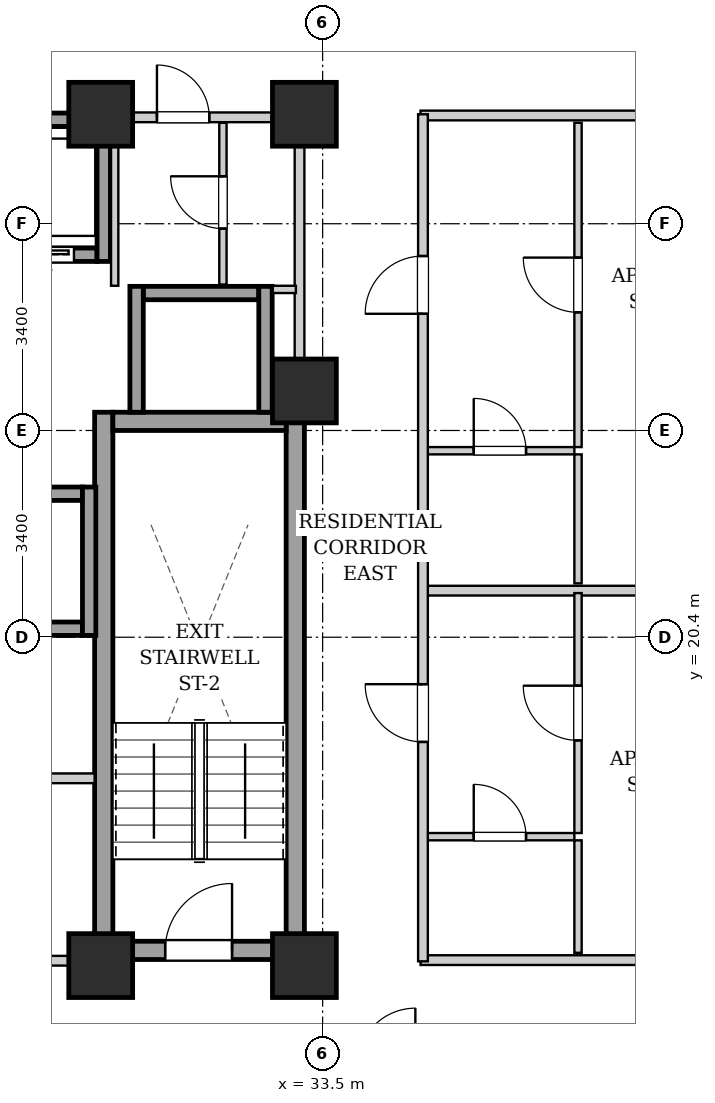
"""IFC4 building model, lengths in metres.
Left out: names, types, materials, properties, quantities, classifications, styles, units other than length and angle.
Written with IfcOpenShell. Run it as: python <this file> out.ifc"""

import sys

from ifc_helpers import new_model, si_unit, direction, frame, frame_2d, origin, origin_2d, place, context, subcontext, project, spatial, rectangle, extrude, element, fill, save


model = new_model("IFC4")
c1 = context("Model", 3, precision=1e-05, world=origin(), true_north=direction((0.0, 1.0)))
c2 = subcontext(c1, "Body", "Model", "MODEL_VIEW")
j1 = project(units=[si_unit("LENGTHUNIT", "METRE"), si_unit("PLANEANGLEUNIT", "RADIAN")], contexts=[c1])
p1 = place(None, origin())
s1 = spatial("IfcSite", under=j1, at=p1, CompositionType="ELEMENT")
p2 = place(p1, origin())
s2 = spatial("IfcBuilding", under=s1, at=p2, CompositionType="ELEMENT")
p3 = place(p2, frame((0.0, 0.0, 91.1)))
s3 = spatial("IfcBuildingStorey", under=s2, at=p3, CompositionType="ELEMENT", Elevation=91.1)
for number, where, z_axis, x_axis in (
    (1, (29.85, 15.0, 0.0), (0.0, 0.0, 1.0), (1.0, 0.0, 0.0)),
    (2, (33.2, 15.0, 0.0), (0.0, 0.0, 1.0), (1.0, 0.0, 0.0)),
    (3, (29.85, 29.0, 0.0), (0.0, 0.0, 1.0), (1.0, 0.0, 0.0)),
    (4, (33.2, 29.0, 0.0), (0.0, 0.0, 1.0), (1.0, 0.0, 0.0)),
    (5, (33.2, 24.45, 0.0), (0.0, 0.0, 1.0), (1.0, 0.0, 0.0)),
):
    element("IfcColumn", number, at=place(p3, frame(where, z_axis=z_axis, x_axis=x_axis)), inside=s3, PredefinedType="COLUMN", context=c2, shape_type="SweptSolid", body=[
        extrude(rectangle(XDim=1.05, YDim=1.05, at=origin_2d()), origin(), (0.0, 0.0, 1.0), 3.2),
    ])
for number, where, z_axis, x_axis in (
    (6, (29.9, 15.1, 0.0), (0.0, 0.0, 1.0), (0.0, 1.0, 0.0)),
    (7, (33.05, 15.1, 0.0), (0.0, 0.0, 1.0), (0.0, 1.0, 0.0)),
):
    element("IfcWall", number, at=place(p3, frame(where, z_axis=z_axis, x_axis=x_axis)), inside=s3, PredefinedType="SHEAR", context=c2, shape_type="SweptSolid", body=[
        extrude(rectangle(XDim=9.0, YDim=0.3, at=frame_2d((4.5, 0.0))), origin(), (0.0, 0.0, 1.0), 2.94),
    ])
p4 = place(p3, frame((30.05, 23.95, 0.0), z_axis=(0.0, 0.0, 1.0), x_axis=(1.0, 0.0, 0.0)))
e8 = element("IfcWall", 8, at=p4, inside=s3, PredefinedType="SHEAR", context=c2, shape_type="SweptSolid", body=[
    extrude(rectangle(XDim=2.85, YDim=0.3, at=frame_2d((1.425, 0.0))), origin(), (0.0, 0.0, 1.0), 2.94),
])
p5 = place(p3, frame((30.05, 15.25, 0.0), z_axis=(0.0, 0.0, 1.0), x_axis=(1.0, 0.0, 0.0)))
e9 = element("IfcWall", 9, at=p5, inside=s3, PredefinedType="SHEAR", context=c2, shape_type="SweptSolid", body=[
    extrude(rectangle(XDim=2.85, YDim=0.3, at=frame_2d((1.425, 0.0))), origin(), (0.0, 0.0, 1.0), 2.94),
])
p6 = place(p5, frame((0.86, 0.0, 0.0)))
e10 = element("IfcOpeningElement", 10, at=p6, cuts=e9, PredefinedType="OPENING", context=c2, shape_type="SweptSolid", body=[
    extrude(rectangle(XDim=1.1, YDim=2.05, at=frame_2d((0.55, 1.025))), frame((0.0, 0.16, 0.0), z_axis=(0.0, -1.0, 0.0), x_axis=(1.0, 0.0, 0.0)), (0.0, 0.0, 1.0), 0.32),
])
p7 = place(p3, frame((27.93, 26.69, 0.0), z_axis=(0.0, 0.0, 1.0), x_axis=(1.0, 0.0, 0.0)))
e11 = element("IfcWall", 11, at=p7, inside=s3, PredefinedType="SHEAR", context=c2, shape_type="SweptSolid", body=[
    extrude(rectangle(XDim=1.86, YDim=0.22, at=frame_2d((0.93, 0.0))), origin(), (0.0, 0.0, 1.0), 2.94),
])
p8 = place(p7, frame((0.38, 0.0, 0.0)))
e12 = element("IfcOpeningElement", 12, at=p8, cuts=e11, PredefinedType="OPENING", context=c2, shape_type="SweptSolid", body=[
    extrude(rectangle(XDim=1.1, YDim=2.15, at=frame_2d((0.55, 1.075))), frame((0.0, 0.12, 0.0), z_axis=(0.0, -1.0, 0.0), x_axis=(1.0, 0.0, 0.0)), (0.0, 0.0, 1.0), 0.24),
])
p9 = place(p3, frame((27.93, 28.91, 0.0), z_axis=(0.0, 0.0, 1.0), x_axis=(1.0, 0.0, 0.0)))
e13 = element("IfcWall", 13, at=p9, inside=s3, PredefinedType="SHEAR", context=c2, shape_type="SweptSolid", body=[
    extrude(rectangle(XDim=1.86, YDim=0.22, at=frame_2d((0.93, 0.0))), origin(), (0.0, 0.0, 1.0), 2.94),
])
p10 = place(p3, frame((29.9, 26.58, 0.0), z_axis=(0.0, 0.0, 1.0), x_axis=(0.0, 1.0, 0.0)))
e14 = element("IfcWall", 14, at=p10, inside=s3, PredefinedType="SHEAR", context=c2, shape_type="SweptSolid", body=[
    extrude(rectangle(XDim=2.44, YDim=0.22, at=frame_2d((1.22, 0.0))), origin(), (0.0, 0.0, 1.0), 2.94),
])
for number, where, z_axis, x_axis in (
    (15, (27.65, 20.54, 0.0), (0.0, 0.0, 1.0), (1.0, 0.0, 0.0)),
    (16, (27.65, 22.76, 0.0), (0.0, 0.0, 1.0), (1.0, 0.0, 0.0)),
):
    element("IfcWall", number, at=place(p3, frame(where, z_axis=z_axis, x_axis=x_axis)), inside=s3, PredefinedType="SHEAR", context=c2, shape_type="SweptSolid", body=[
        extrude(rectangle(XDim=1.9, YDim=0.22, at=frame_2d((0.95, 0.0))), origin(), (0.0, 0.0, 1.0), 2.94),
    ])
p11 = place(p3, frame((29.66, 20.43, 0.0), z_axis=(0.0, 0.0, 1.0), x_axis=(0.0, 1.0, 0.0)))
e17 = element("IfcWall", 17, at=p11, inside=s3, PredefinedType="SHEAR", context=c2, shape_type="SweptSolid", body=[
    extrude(rectangle(XDim=2.44, YDim=0.22, at=frame_2d((1.22, 0.0))), origin(), (0.0, 0.0, 1.0), 2.94),
])
p12 = place(p3, frame((30.55, 26.06, 0.0), z_axis=(0.0, 0.0, 1.0), x_axis=(1.0, 0.0, 0.0)))
e18 = element("IfcWall", 18, at=p12, inside=s3, PredefinedType="SHEAR", context=c2, shape_type="SweptSolid", body=[
    extrude(rectangle(XDim=1.9, YDim=0.22, at=frame_2d((0.95, 0.0))), origin(), (0.0, 0.0, 1.0), 2.94),
])
for number, where, z_axis, x_axis in (
    (19, (30.44, 24.1, 0.0), (0.0, 0.0, 1.0), (0.0, 1.0, 0.0)),
    (20, (32.56, 24.1, 0.0), (0.0, 0.0, 1.0), (0.0, 1.0, 0.0)),
):
    element("IfcWall", number, at=place(p3, frame(where, z_axis=z_axis, x_axis=x_axis)), inside=s3, PredefinedType="SHEAR", context=c2, shape_type="SweptSolid", body=[
        extrude(rectangle(XDim=2.07, YDim=0.22, at=frame_2d((1.035, 0.0))), origin(), (0.0, 0.0, 1.0), 2.94),
    ])
p13 = place(p3, frame((21.25, 15.08, 0.0), z_axis=(0.0, 0.0, 1.0), x_axis=(1.0, 0.0, 0.0)))
e21 = element("IfcWall", 21, at=p13, inside=s3, PredefinedType="PARTITIONING", context=c2, shape_type="SweptSolid", body=[
    extrude(rectangle(XDim=8.5, YDim=0.16, at=frame_2d((4.25, 0.0))), origin(), (0.0, 0.0, 1.0), 2.309),
])
p14 = place(p13, frame((3.725, 0.0, 0.0)))
e22 = element("IfcOpeningElement", 22, at=p14, cuts=e21, PredefinedType="OPENING", context=c2, shape_type="SweptSolid", body=[
    extrude(rectangle(XDim=1.05, YDim=2.05, at=frame_2d((0.525, 1.025))), frame((0.0, 0.09, 0.0), z_axis=(0.0, -1.0, 0.0), x_axis=(1.0, 0.0, 0.0)), (0.0, 0.0, 1.0), 0.18),
])
p15 = place(p3, frame((28.65, 18.08, 0.0), z_axis=(0.0, 0.0, 1.0), x_axis=(1.0, 0.0, 0.0)))
e23 = element("IfcWall", 23, at=p15, inside=s3, PredefinedType="PARTITIONING", context=c2, shape_type="SweptSolid", body=[
    extrude(rectangle(XDim=1.1, YDim=0.16, at=frame_2d((0.55, 0.0))), origin(), (0.0, 0.0, 1.0), 2.94),
])
p16 = place(p3, frame((33.12, 24.12, 0.0), z_axis=(0.0, 0.0, 1.0), x_axis=(0.0, 1.0, 0.0)))
e24 = element("IfcWall", 24, at=p16, inside=s3, PredefinedType="PARTITIONING", context=c2, shape_type="SweptSolid", body=[
    extrude(rectangle(XDim=4.76, YDim=0.16, at=frame_2d((2.38, 0.0))), origin(), (0.0, 0.0, 1.0), 2.94),
])
p17 = place(p3, frame((30.08, 26.18, 0.0), z_axis=(0.0, 0.0, 1.0), x_axis=(0.0, 1.0, 0.0)))
e25 = element("IfcWall", 25, at=p17, inside=s3, PredefinedType="PARTITIONING", context=c2, shape_type="SweptSolid", body=[
    extrude(rectangle(XDim=2.68, YDim=0.12, at=frame_2d((1.34, 0.0))), origin(), (0.0, 0.0, 1.0), 2.94),
])
p18 = place(p3, frame((32.68, 26.12, 0.0), z_axis=(0.0, 0.0, 1.0), x_axis=(1.0, 0.0, 0.0)))
e26 = element("IfcWall", 26, at=p18, inside=s3, PredefinedType="PARTITIONING", context=c2, shape_type="SweptSolid", body=[
    extrude(rectangle(XDim=0.38, YDim=0.12, at=frame_2d((0.19, 0.0))), origin(), (0.0, 0.0, 1.0), 2.94),
])
p19 = place(p3, frame((31.86, 26.2, 0.0), z_axis=(0.0, 0.0, 1.0), x_axis=(0.0, 1.0, 0.0)))
e27 = element("IfcWall", 27, at=p19, inside=s3, PredefinedType="PARTITIONING", context=c2, shape_type="SweptSolid", body=[
    extrude(rectangle(XDim=2.66, YDim=0.12, at=frame_2d((1.33, 0.0))), origin(), (0.0, 0.0, 1.0), 2.94),
])
p20 = place(p19, frame((0.92, 0.0, 0.0)))
e28 = element("IfcOpeningElement", 28, at=p20, cuts=e27, PredefinedType="OPENING", context=c2, shape_type="SweptSolid", body=[
    extrude(rectangle(XDim=0.86, YDim=2.05, at=frame_2d((0.43, 1.025))), frame((0.0, 0.07, 0.0), z_axis=(0.0, -1.0, 0.0), x_axis=(1.0, 0.0, 0.0)), (0.0, 0.0, 1.0), 0.14),
])
p21 = place(p3, frame((30.08, 28.95, 0.0), z_axis=(0.0, 0.0, 1.0), x_axis=(1.0, 0.0, 0.0)))
e29 = element("IfcWall", 29, at=p21, inside=s3, PredefinedType="PARTITIONING", context=c2, shape_type="SweptSolid", body=[
    extrude(rectangle(XDim=2.96, YDim=0.16, at=frame_2d((1.48, 0.0))), origin(), (0.0, 0.0, 1.0), 2.94),
])
p22 = place(p21, frame((0.695, 0.0, 0.0)))
e30 = element("IfcOpeningElement", 30, at=p22, cuts=e29, PredefinedType="OPENING", context=c2, shape_type="SweptSolid", body=[
    extrude(rectangle(XDim=0.86, YDim=2.05, at=frame_2d((0.43, 1.025))), frame((0.0, 0.09, 0.0), z_axis=(0.0, -1.0, 0.0), x_axis=(1.0, 0.0, 0.0)), (0.0, 0.0, 1.0), 0.18),
])
for number, where, z_axis, x_axis in (
    (31, (35.11, 15.09, 0.0), (0.0, 0.0, 1.0), (1.0, 0.0, 0.0)),
    (32, (35.11, 28.98, 0.0), (0.0, 0.0, 1.0), (1.0, 0.0, 0.0)),
):
    element("IfcWall", number, at=place(p3, frame(where, z_axis=z_axis, x_axis=x_axis)), inside=s3, PredefinedType="PARTITIONING", context=c2, shape_type="SweptSolid", body=[
        extrude(rectangle(XDim=8.01, YDim=0.16, at=frame_2d((4.005, 0.0))), origin(), (0.0, 0.0, 1.0), 2.309),
    ])
p23 = place(p3, frame((35.19, 21.166, 0.0), z_axis=(0.0, 0.0, 1.0), x_axis=(1.0, 0.0, 0.0)))
e33 = element("IfcWall", 33, at=p23, inside=s3, PredefinedType="PARTITIONING", context=c2, shape_type="SweptSolid", body=[
    extrude(rectangle(XDim=7.93, YDim=0.16, at=frame_2d((3.965, 0.0))), origin(), (0.0, 0.0, 1.0), 2.94),
])
p24 = place(p3, frame((35.19, 17.12, 0.0), z_axis=(0.0, 0.0, 1.0), x_axis=(1.0, 0.0, 0.0)))
e34 = element("IfcWall", 34, at=p24, inside=s3, PredefinedType="PARTITIONING", context=c2, shape_type="SweptSolid", body=[
    extrude(rectangle(XDim=2.45, YDim=0.12, at=frame_2d((1.225, 0.0))), origin(), (0.0, 0.0, 1.0), 2.94),
])
p25 = place(p24, frame((0.795, 0.0, 0.0)))
e35 = element("IfcOpeningElement", 35, at=p25, cuts=e34, PredefinedType="OPENING", context=c2, shape_type="SweptSolid", body=[
    extrude(rectangle(XDim=0.86, YDim=2.05, at=frame_2d((0.43, 1.025))), frame((0.0, 0.07, 0.0), z_axis=(0.0, -1.0, 0.0), x_axis=(1.0, 0.0, 0.0)), (0.0, 0.0, 1.0), 0.14),
])
p26 = place(p3, frame((37.7, 15.21, 0.0), z_axis=(0.0, 0.0, 1.0), x_axis=(0.0, 1.0, 0.0)))
e36 = element("IfcWall", 36, at=p26, inside=s3, PredefinedType="PARTITIONING", context=c2, shape_type="SweptSolid", body=[
    extrude(rectangle(XDim=1.85, YDim=0.12, at=frame_2d((0.925, 0.0))), origin(), (0.0, 0.0, 1.0), 2.94),
])
p27 = place(p3, frame((37.7, 17.18, 0.0), z_axis=(0.0, 0.0, 1.0), x_axis=(0.0, 1.0, 0.0)))
e37 = element("IfcWall", 37, at=p27, inside=s3, PredefinedType="PARTITIONING", context=c2, shape_type="SweptSolid", body=[
    extrude(rectangle(XDim=3.946, YDim=0.12, at=frame_2d((1.973, 0.0))), origin(), (0.0, 0.0, 1.0), 2.94),
])
p28 = place(p27, frame((1.523, 0.0, 0.0)))
e38 = element("IfcOpeningElement", 38, at=p28, cuts=e37, PredefinedType="OPENING", context=c2, shape_type="SweptSolid", body=[
    extrude(rectangle(XDim=0.9, YDim=2.05, at=frame_2d((0.45, 1.025))), frame((0.0, 0.07, 0.0), z_axis=(0.0, -1.0, 0.0), x_axis=(1.0, 0.0, 0.0)), (0.0, 0.0, 1.0), 0.14),
])
p29 = place(p3, frame((35.19, 23.467, 0.0), z_axis=(0.0, 0.0, 1.0), x_axis=(1.0, 0.0, 0.0)))
e39 = element("IfcWall", 39, at=p29, inside=s3, PredefinedType="PARTITIONING", context=c2, shape_type="SweptSolid", body=[
    extrude(rectangle(XDim=2.45, YDim=0.12, at=frame_2d((1.225, 0.0))), origin(), (0.0, 0.0, 1.0), 2.94),
])
p30 = place(p29, frame((0.795, 0.0, 0.0)))
e40 = element("IfcOpeningElement", 40, at=p30, cuts=e39, PredefinedType="OPENING", context=c2, shape_type="SweptSolid", body=[
    extrude(rectangle(XDim=0.86, YDim=2.05, at=frame_2d((0.43, 1.025))), frame((0.0, 0.07, 0.0), z_axis=(0.0, -1.0, 0.0), x_axis=(1.0, 0.0, 0.0)), (0.0, 0.0, 1.0), 0.14),
])
p31 = place(p3, frame((37.7, 21.286, 0.0), z_axis=(0.0, 0.0, 1.0), x_axis=(0.0, 1.0, 0.0)))
e41 = element("IfcWall", 41, at=p31, inside=s3, PredefinedType="PARTITIONING", context=c2, shape_type="SweptSolid", body=[
    extrude(rectangle(XDim=2.121, YDim=0.12, at=frame_2d((1.061, 0.0))), origin(), (0.0, 0.0, 1.0), 2.94),
])
p32 = place(p3, frame((37.7, 23.527, 0.0), z_axis=(0.0, 0.0, 1.0), x_axis=(0.0, 1.0, 0.0)))
e42 = element("IfcWall", 42, at=p32, inside=s3, PredefinedType="PARTITIONING", context=c2, shape_type="SweptSolid", body=[
    extrude(rectangle(XDim=5.333, YDim=0.12, at=frame_2d((2.667, 0.0))), origin(), (0.0, 0.0, 1.0), 2.94),
])
p33 = place(p32, frame((2.216, 0.0, 0.0)))
e43 = element("IfcOpeningElement", 43, at=p33, cuts=e42, PredefinedType="OPENING", context=c2, shape_type="SweptSolid", body=[
    extrude(rectangle(XDim=0.9, YDim=2.05, at=frame_2d((0.45, 1.025))), frame((0.0, 0.07, 0.0), z_axis=(0.0, -1.0, 0.0), x_axis=(1.0, 0.0, 0.0)), (0.0, 0.0, 1.0), 0.14),
])
p34 = place(p3, frame((35.15, 15.07, 0.0), z_axis=(0.0, 0.0, 1.0), x_axis=(0.0, 1.0, 0.0)))
e44 = element("IfcWall", 44, at=p34, inside=s3, PredefinedType="PARTITIONING", context=c2, shape_type="SweptSolid", body=[
    extrude(rectangle(XDim=13.93, YDim=0.16, at=frame_2d((6.965, 0.0))), origin(), (0.0, 0.0, 1.0), 2.94),
])
p35 = place(p34, frame((3.608, 0.0, 0.0)))
e45 = element("IfcOpeningElement", 45, at=p35, cuts=e44, PredefinedType="OPENING", context=c2, shape_type="SweptSolid", body=[
    extrude(rectangle(XDim=0.95, YDim=2.1, at=frame_2d((0.475, 1.05))), frame((0.0, 0.09, 0.0), z_axis=(0.0, -1.0, 0.0), x_axis=(1.0, 0.0, 0.0)), (0.0, 0.0, 1.0), 0.18),
])
p36 = place(p34, frame((10.649, 0.0, 0.0)))
e46 = element("IfcOpeningElement", 46, at=p36, cuts=e44, PredefinedType="OPENING", context=c2, shape_type="SweptSolid", body=[
    extrude(rectangle(XDim=0.95, YDim=2.1, at=frame_2d((0.475, 1.05))), frame((0.0, 0.09, 0.0), z_axis=(0.0, -1.0, 0.0), x_axis=(1.0, 0.0, 0.0)), (0.0, 0.0, 1.0), 0.18),
])
p37 = place(p6, origin())
e47 = element("IfcDoor", 47, at=p37, inside=s3, OperationType="SINGLE_SWING_RIGHT", PredefinedType="DOOR", context=c2, shape_type="SweptSolid", body=[
    extrude(rectangle(XDim=1.1, YDim=2.05, at=frame_2d((0.55, 1.025))), frame((0.0, 0.025, 0.0), z_axis=(0.0, -1.0, 0.0), x_axis=(1.0, 0.0, 0.0)), (0.0, 0.0, 1.0), 0.05),
])
fill(e10, e47)
p38 = place(p8, origin())
e48 = element("IfcDoor", 48, at=p38, inside=s3, OperationType="SLIDING_TO_LEFT", PredefinedType="DOOR", context=c2, shape_type="SweptSolid", body=[
    extrude(rectangle(XDim=1.1, YDim=2.15, at=frame_2d((0.55, 1.075))), frame((0.0, 0.025, 0.0), z_axis=(0.0, -1.0, 0.0), x_axis=(1.0, 0.0, 0.0)), (0.0, 0.0, 1.0), 0.05),
])
fill(e12, e48)
p39 = place(p20, origin())
e49 = element("IfcDoor", 49, at=p39, inside=s3, OperationType="SINGLE_SWING_RIGHT", PredefinedType="DOOR", context=c2, shape_type="SweptSolid", body=[
    extrude(rectangle(XDim=0.86, YDim=2.05, at=frame_2d((0.43, 1.025))), frame((0.0, 0.025, 0.0), z_axis=(0.0, -1.0, 0.0), x_axis=(1.0, 0.0, 0.0)), (0.0, 0.0, 1.0), 0.05),
])
fill(e28, e49)
p40 = place(p22, origin())
e50 = element("IfcDoor", 50, at=p40, inside=s3, OperationType="SINGLE_SWING_LEFT", PredefinedType="DOOR", context=c2, shape_type="SweptSolid", body=[
    extrude(rectangle(XDim=0.86, YDim=2.05, at=frame_2d((0.43, 1.025))), frame((0.0, 0.025, 0.0), z_axis=(0.0, -1.0, 0.0), x_axis=(1.0, 0.0, 0.0)), (0.0, 0.0, 1.0), 0.05),
])
fill(e30, e50)
p41 = place(p25, origin())
e51 = element("IfcDoor", 51, at=p41, inside=s3, OperationType="SINGLE_SWING_LEFT", PredefinedType="DOOR", context=c2, shape_type="SweptSolid", body=[
    extrude(rectangle(XDim=0.86, YDim=2.05, at=frame_2d((0.43, 1.025))), frame((0.0, 0.025, 0.0), z_axis=(0.0, -1.0, 0.0), x_axis=(1.0, 0.0, 0.0)), (0.0, 0.0, 1.0), 0.05),
])
fill(e35, e51)
p42 = place(p28, origin())
e52 = element("IfcDoor", 52, at=p42, inside=s3, OperationType="SINGLE_SWING_RIGHT", PredefinedType="DOOR", context=c2, shape_type="SweptSolid", body=[
    extrude(rectangle(XDim=0.9, YDim=2.05, at=frame_2d((0.45, 1.025))), frame((0.0, 0.025, 0.0), z_axis=(0.0, -1.0, 0.0), x_axis=(1.0, 0.0, 0.0)), (0.0, 0.0, 1.0), 0.05),
])
fill(e38, e52)
p43 = place(p30, origin())
e53 = element("IfcDoor", 53, at=p43, inside=s3, OperationType="SINGLE_SWING_LEFT", PredefinedType="DOOR", context=c2, shape_type="SweptSolid", body=[
    extrude(rectangle(XDim=0.86, YDim=2.05, at=frame_2d((0.43, 1.025))), frame((0.0, 0.025, 0.0), z_axis=(0.0, -1.0, 0.0), x_axis=(1.0, 0.0, 0.0)), (0.0, 0.0, 1.0), 0.05),
])
fill(e40, e53)
p44 = place(p33, origin())
e54 = element("IfcDoor", 54, at=p44, inside=s3, OperationType="SINGLE_SWING_RIGHT", PredefinedType="DOOR", context=c2, shape_type="SweptSolid", body=[
    extrude(rectangle(XDim=0.9, YDim=2.05, at=frame_2d((0.45, 1.025))), frame((0.0, 0.025, 0.0), z_axis=(0.0, -1.0, 0.0), x_axis=(1.0, 0.0, 0.0)), (0.0, 0.0, 1.0), 0.05),
])
fill(e43, e54)
p45 = place(p35, origin())
e55 = element("IfcDoor", 55, at=p45, inside=s3, OperationType="SINGLE_SWING_RIGHT", PredefinedType="DOOR", context=c2, shape_type="SweptSolid", body=[
    extrude(rectangle(XDim=0.95, YDim=2.1, at=frame_2d((0.475, 1.05))), frame((0.0, 0.025, 0.0), z_axis=(0.0, -1.0, 0.0), x_axis=(1.0, 0.0, 0.0)), (0.0, 0.0, 1.0), 0.05),
])
fill(e45, e55)
p46 = place(p36, origin())
e56 = element("IfcDoor", 56, at=p46, inside=s3, OperationType="SINGLE_SWING_LEFT", PredefinedType="DOOR", context=c2, shape_type="SweptSolid", body=[
    extrude(rectangle(XDim=0.95, YDim=2.1, at=frame_2d((0.475, 1.05))), frame((0.0, 0.025, 0.0), z_axis=(0.0, -1.0, 0.0), x_axis=(1.0, 0.0, 0.0)), (0.0, 0.0, 1.0), 0.05),
])
fill(e46, e56)
save(model, sys.argv[1])
